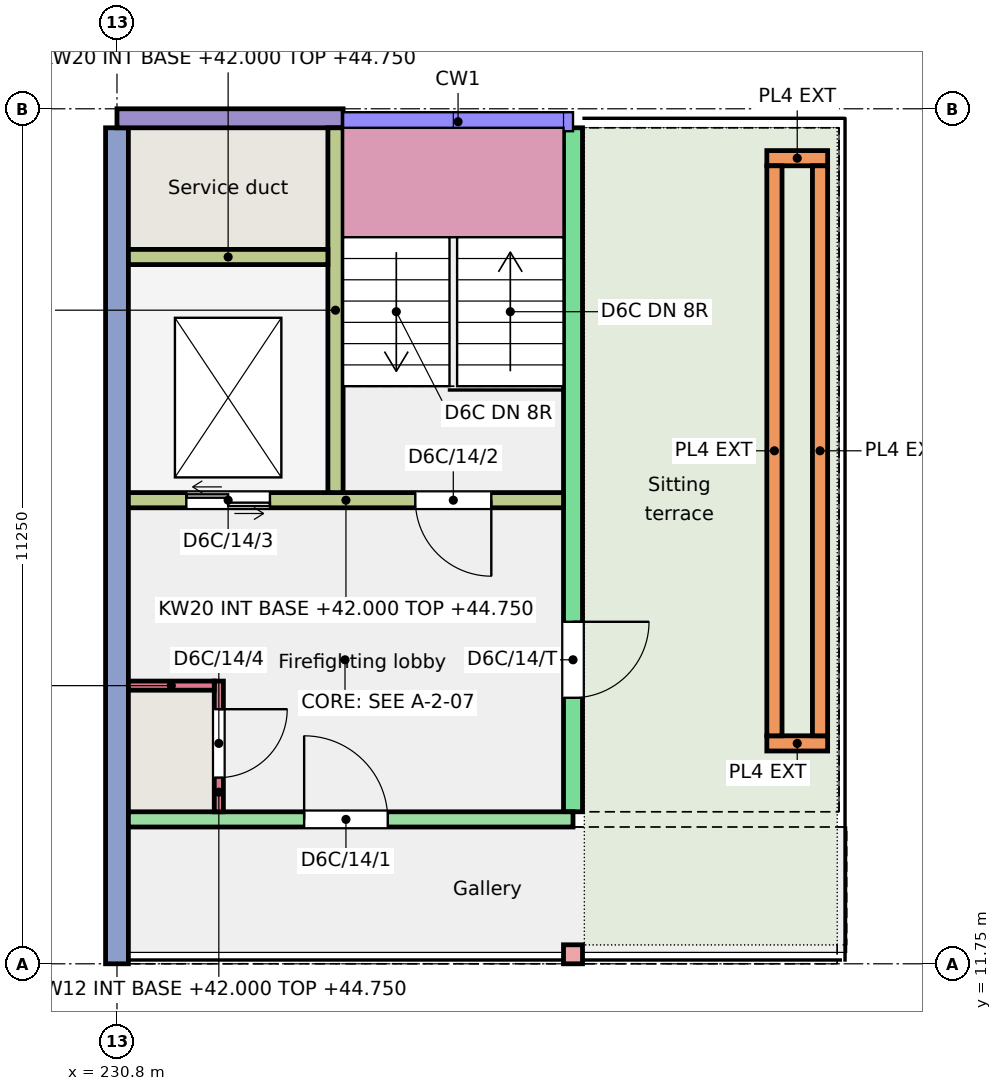
"""IFC4 building model, lengths in metres.
Left out: names, types, materials, properties, quantities, classifications, styles, units other than length and angle.
Written with IfcOpenShell. Run it as: python <this file> out.ifc"""

import sys

from ifc_helpers import new_model, si_unit, direction, frame, frame_2d, origin, origin_2d, place, context, subcontext, project, spatial, rectangle, extrude, element, fill, save


model = new_model("IFC4")
c1 = context("Model", 3, precision=1e-05, world=origin(), true_north=direction((0.0, 1.0)))
c2 = subcontext(c1, "Body", "Model", "MODEL_VIEW")
j1 = project(units=[si_unit("LENGTHUNIT", "METRE"), si_unit("PLANEANGLEUNIT", "RADIAN")], contexts=[c1])
p1 = place(None, origin())
s1 = spatial("IfcSite", under=j1, at=p1, CompositionType="ELEMENT")
p2 = place(p1, origin())
s2 = spatial("IfcBuilding", under=s1, at=p2, CompositionType="ELEMENT")
p3 = place(p2, frame((0.0, 0.0, 42.0)))
s3 = spatial("IfcBuildingStorey", under=s2, at=p3, CompositionType="ELEMENT", Elevation=42.0)
p4 = place(p3, frame((230.8, 11.75, 0.0), z_axis=(0.0, 0.0, 1.0), x_axis=(0.0, 1.0, 0.0)))
e1 = element("IfcWall", 1, at=p4, inside=s3, PredefinedType="SHEAR", context=c2, shape_type="SweptSolid", body=[
    extrude(rectangle(XDim=11.0, YDim=0.3, at=frame_2d((5.5, 0.0))), origin(), (0.0, 0.0, 1.0), 3.0),
])
p5 = place(p3, frame((236.8, 13.75, 0.0), z_axis=(0.0, 0.0, 1.0), x_axis=(0.0, 1.0, 0.0)))
e2 = element("IfcWall", 2, at=p5, inside=s3, PredefinedType="SHEAR", context=c2, shape_type="SweptSolid", body=[
    extrude(rectangle(XDim=9.0, YDim=0.25, at=frame_2d((4.5, 0.0))), origin(), (0.0, 0.0, 1.0), 3.0),
])
p6 = place(p5, frame((1.5, 0.0, 0.0)))
e3 = element("IfcOpeningElement", 3, at=p6, cuts=e2, PredefinedType="OPENING", context=c2, shape_type="SweptSolid", body=[
    extrude(rectangle(XDim=1.0, YDim=2.1, at=frame_2d((0.5, 1.05))), frame((0.0, 0.135, 0.0), z_axis=(0.0, -1.0, 0.0), x_axis=(1.0, 0.0, 0.0)), (0.0, 0.0, 1.0), 0.27),
])
p7 = place(p3, frame((230.8, 22.875, 0.0), z_axis=(0.0, 0.0, 1.0), x_axis=(1.0, 0.0, 0.0)))
e4 = element("IfcWall", 4, at=p7, inside=s3, PredefinedType="SOLIDWALL", context=c2, shape_type="SweptSolid", body=[
    extrude(rectangle(XDim=2.975, YDim=0.25, at=frame_2d((1.487, 0.0))), origin(), (0.0, 0.0, 1.0), 3.0),
])
p8 = place(p3, frame((230.95, 13.65, 0.0), z_axis=(0.0, 0.0, 1.0), x_axis=(1.0, 0.0, 0.0)))
e5 = element("IfcWall", 5, at=p8, inside=s3, PredefinedType="SHEAR", context=c2, shape_type="SweptSolid", body=[
    extrude(rectangle(XDim=5.85, YDim=0.2, at=frame_2d((2.925, 0.0))), origin(), (0.0, 0.0, 1.0), 2.75),
])
p9 = place(p8, frame((2.312, 0.0, 0.0)))
e6 = element("IfcOpeningElement", 6, at=p9, cuts=e5, PredefinedType="OPENING", context=c2, shape_type="SweptSolid", body=[
    extrude(rectangle(XDim=1.1, YDim=2.1, at=frame_2d((0.55, 1.05))), frame((0.0, 0.11, 0.0), z_axis=(0.0, -1.0, 0.0), x_axis=(1.0, 0.0, 0.0)), (0.0, 0.0, 1.0), 0.22),
])
p10 = place(p3, frame((230.95, 17.85, 0.0), z_axis=(0.0, 0.0, 1.0), x_axis=(1.0, 0.0, 0.0)))
e7 = element("IfcWall", 7, at=p10, inside=s3, PredefinedType="SHEAR", context=c2, shape_type="SweptSolid", body=[
    extrude(rectangle(XDim=5.725, YDim=0.2, at=frame_2d((2.863, 0.0))), origin(), (0.0, 0.0, 1.0), 2.75),
])
p11 = place(p10, frame((3.775, 0.0, 0.0)))
e8 = element("IfcOpeningElement", 8, at=p11, cuts=e7, PredefinedType="OPENING", context=c2, shape_type="SweptSolid", body=[
    extrude(rectangle(XDim=1.0, YDim=2.1, at=frame_2d((0.5, 1.05))), frame((0.0, 0.11, 0.0), z_axis=(0.0, -1.0, 0.0), x_axis=(1.0, 0.0, 0.0)), (0.0, 0.0, 1.0), 0.22),
])
p12 = place(p10, frame((0.762, 0.0, 0.0)))
e9 = element("IfcOpeningElement", 9, at=p12, cuts=e7, PredefinedType="OPENING", context=c2, shape_type="SweptSolid", body=[
    extrude(rectangle(XDim=1.1, YDim=2.1, at=frame_2d((0.55, 1.05))), frame((0.0, 0.11, 0.0), z_axis=(0.0, -1.0, 0.0), x_axis=(1.0, 0.0, 0.0)), (0.0, 0.0, 1.0), 0.22),
])
p13 = place(p3, frame((233.675, 17.95, 0.0), z_axis=(0.0, 0.0, 1.0), x_axis=(0.0, 1.0, 0.0)))
e10 = element("IfcWall", 10, at=p13, inside=s3, PredefinedType="SHEAR", context=c2, shape_type="SweptSolid", body=[
    extrude(rectangle(XDim=4.8, YDim=0.2, at=frame_2d((2.4, 0.0))), origin(), (0.0, 0.0, 1.0), 2.75),
])
p14 = place(p3, frame((230.95, 21.05, 0.0), z_axis=(0.0, 0.0, 1.0), x_axis=(1.0, 0.0, 0.0)))
e11 = element("IfcWall", 11, at=p14, inside=s3, PredefinedType="SHEAR", context=c2, shape_type="SweptSolid", body=[
    extrude(rectangle(XDim=2.625, YDim=0.2, at=frame_2d((1.312, 0.0))), origin(), (0.0, 0.0, 1.0), 2.75),
])
p15 = place(p3, frame((232.14, 13.75, 0.0), z_axis=(0.0, 0.0, 1.0), x_axis=(0.0, 1.0, 0.0)))
e12 = element("IfcWall", 12, at=p15, inside=s3, PredefinedType="SHEAR", context=c2, shape_type="SweptSolid", body=[
    extrude(rectangle(XDim=1.72, YDim=0.12, at=frame_2d((0.86, 0.0))), origin(), (0.0, 0.0, 1.0), 2.75),
])
p16 = place(p15, frame((0.45, 0.0, 0.0)))
e13 = element("IfcOpeningElement", 13, at=p16, cuts=e12, PredefinedType="OPENING", context=c2, shape_type="SweptSolid", body=[
    extrude(rectangle(XDim=0.9, YDim=2.1, at=frame_2d((0.45, 1.05))), frame((0.0, 0.07, 0.0), z_axis=(0.0, -1.0, 0.0), x_axis=(1.0, 0.0, 0.0)), (0.0, 0.0, 1.0), 0.14),
])
p17 = place(p3, frame((230.95, 15.41, 0.0), z_axis=(0.0, 0.0, 1.0), x_axis=(1.0, 0.0, 0.0)))
e14 = element("IfcWall", 14, at=p17, inside=s3, PredefinedType="SHEAR", context=c2, shape_type="SweptSolid", body=[
    extrude(rectangle(XDim=1.13, YDim=0.12, at=frame_2d((0.565, 0.0))), origin(), (0.0, 0.0, 1.0), 2.75),
])
p18 = place(p3, frame((236.8, 11.875, 0.0), z_axis=(0.0, 0.0, 1.0), x_axis=(1.0, 0.0, 0.0)))
e15 = element("IfcColumn", 15, at=p18, inside=s3, PredefinedType="COLUMN", context=c2, shape_type="SweptSolid", body=[
    extrude(rectangle(XDim=0.25, YDim=0.25, at=origin_2d()), origin(), (0.0, 0.0, 1.0), 3.0),
])
for number, where, z_axis, x_axis in (
    (16, (239.35, 14.65, 0.01), (0.0, 0.0, 1.0), (1.0, 0.0, 0.0)),
    (17, (239.35, 22.35, 0.01), (0.0, 0.0, 1.0), (1.0, 0.0, 0.0)),
):
    element("IfcWall", number, at=place(p3, frame(where, z_axis=z_axis, x_axis=x_axis)), inside=s3, PredefinedType="SOLIDWALL", context=c2, shape_type="SweptSolid", body=[
        extrude(rectangle(XDim=0.8, YDim=0.2, at=frame_2d((0.4, 0.0))), origin(), (0.0, 0.0, 1.0), 0.45),
    ])
for number, where, z_axis, x_axis in (
    (18, (239.45, 14.75, 0.01), (0.0, 0.0, 1.0), (0.0, 1.0, 0.0)),
    (19, (240.05, 14.75, 0.01), (0.0, 0.0, 1.0), (0.0, 1.0, 0.0)),
):
    element("IfcWall", number, at=place(p3, frame(where, z_axis=z_axis, x_axis=x_axis)), inside=s3, PredefinedType="SOLIDWALL", context=c2, shape_type="SweptSolid", body=[
        extrude(rectangle(XDim=7.5, YDim=0.2, at=frame_2d((3.75, 0.0))), origin(), (0.0, 0.0, 1.0), 0.45),
    ])
p19 = place(p9, origin())
e20 = element("IfcDoor", 20, at=p19, inside=s3, OperationType="SINGLE_SWING_LEFT", PredefinedType="DOOR", context=c2, shape_type="SweptSolid", body=[
    extrude(rectangle(XDim=1.1, YDim=2.1, at=frame_2d((0.55, 1.05))), frame((0.0, 0.025, 0.0), z_axis=(0.0, -1.0, 0.0), x_axis=(1.0, 0.0, 0.0)), (0.0, 0.0, 1.0), 0.05),
])
fill(e6, e20)
p20 = place(p11, origin())
e21 = element("IfcDoor", 21, at=p20, inside=s3, OperationType="SINGLE_SWING_RIGHT", PredefinedType="DOOR", context=c2, shape_type="SweptSolid", body=[
    extrude(rectangle(XDim=1.0, YDim=2.1, at=frame_2d((0.5, 1.05))), frame((0.0, 0.025, 0.0), z_axis=(0.0, -1.0, 0.0), x_axis=(1.0, 0.0, 0.0)), (0.0, 0.0, 1.0), 0.05),
])
fill(e8, e21)
p21 = place(p12, origin())
e22 = element("IfcDoor", 22, at=p21, inside=s3, OperationType="DOUBLE_DOOR_SLIDING", PredefinedType="DOOR", context=c2, shape_type="SweptSolid", body=[
    extrude(rectangle(XDim=1.1, YDim=2.1, at=frame_2d((0.55, 1.05))), frame((0.0, 0.025, 0.0), z_axis=(0.0, -1.0, 0.0), x_axis=(1.0, 0.0, 0.0)), (0.0, 0.0, 1.0), 0.05),
])
fill(e9, e22)
p22 = place(p16, origin())
e23 = element("IfcDoor", 23, at=p22, inside=s3, OperationType="SINGLE_SWING_RIGHT", PredefinedType="DOOR", context=c2, shape_type="SweptSolid", body=[
    extrude(rectangle(XDim=0.9, YDim=2.1, at=frame_2d((0.45, 1.05))), frame((0.0, 0.025, 0.0), z_axis=(0.0, -1.0, 0.0), x_axis=(1.0, 0.0, 0.0)), (0.0, 0.0, 1.0), 0.05),
])
fill(e13, e23)
p23 = place(p6, origin())
e24 = element("IfcDoor", 24, at=p23, inside=s3, OperationType="SINGLE_SWING_RIGHT", PredefinedType="DOOR", context=c2, shape_type="SweptSolid", body=[
    extrude(rectangle(XDim=1.0, YDim=2.1, at=frame_2d((0.5, 1.05))), frame((0.0, 0.025, 0.0), z_axis=(0.0, -1.0, 0.0), x_axis=(1.0, 0.0, 0.0)), (0.0, 0.0, 1.0), 0.05),
])
fill(e3, e24)
save(model, sys.argv[1])
